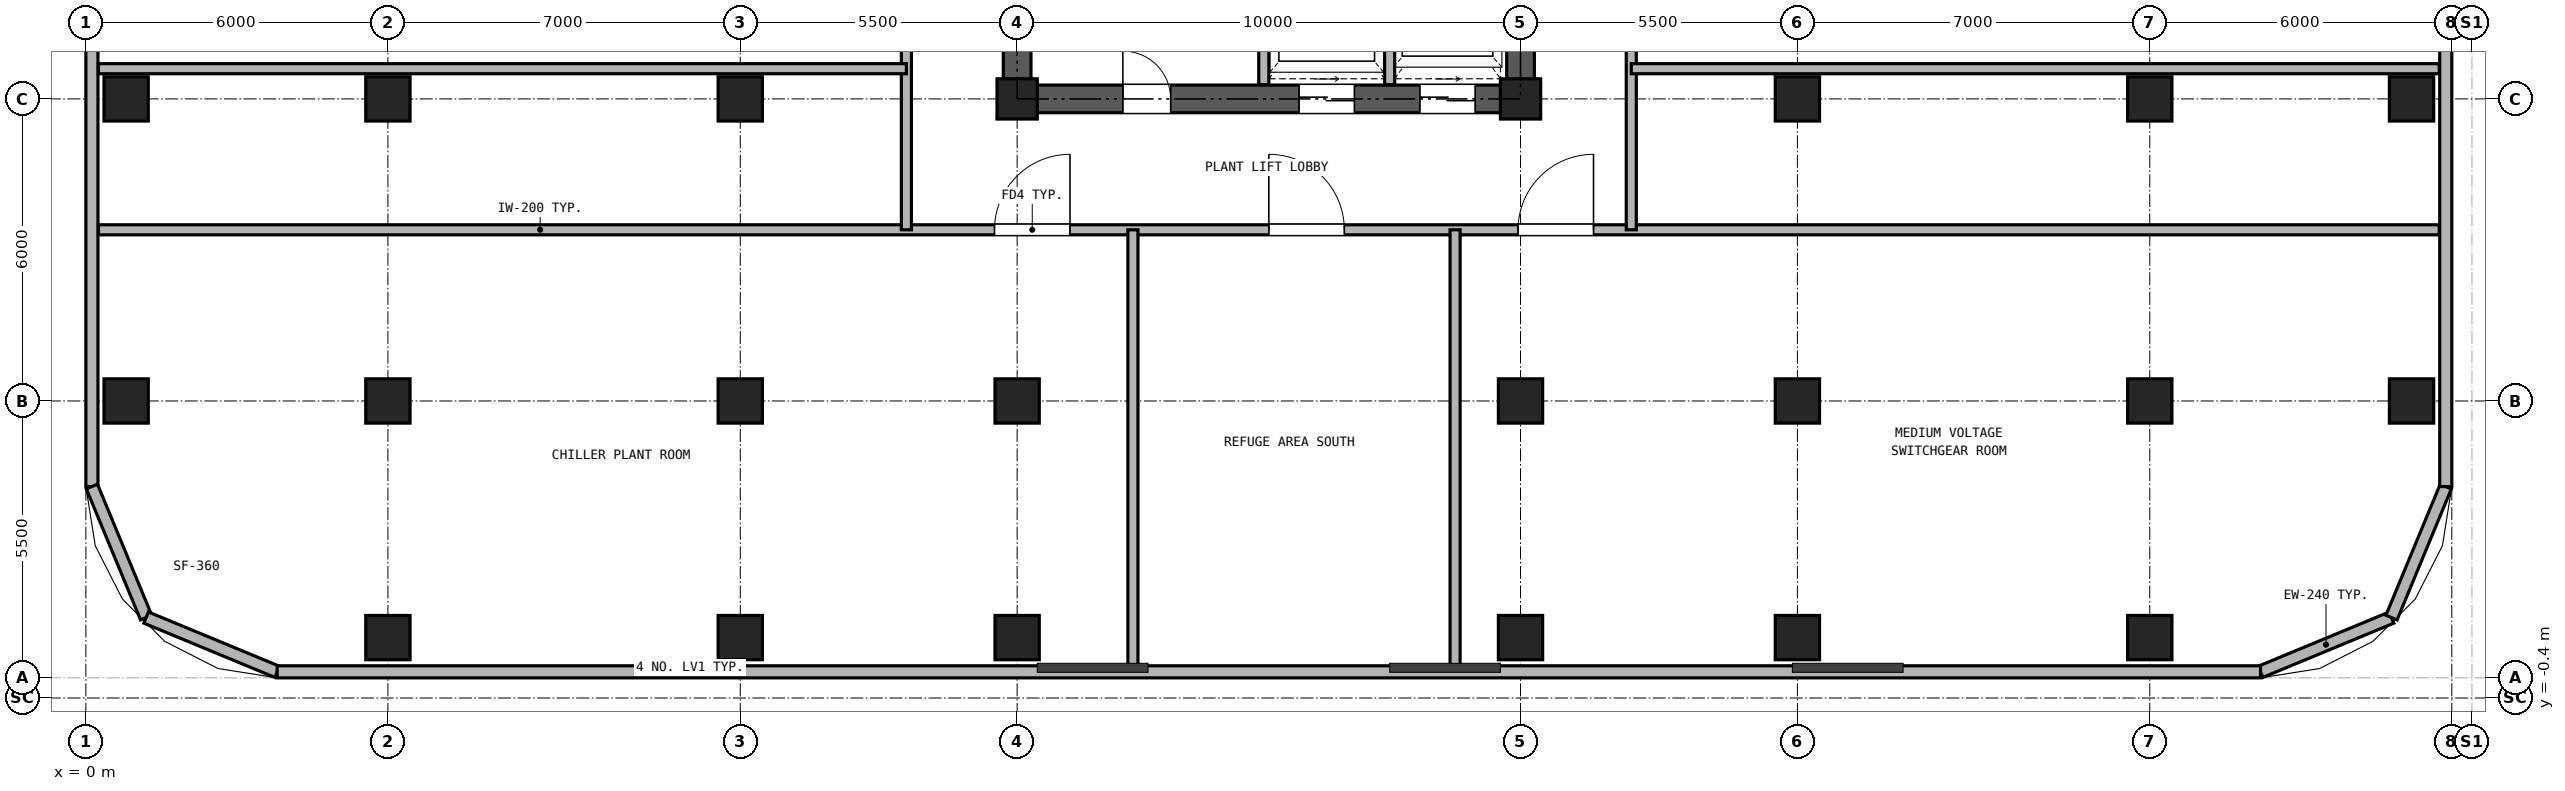
"""IFC4 building model, lengths in metres.
Left out: names, types, materials, properties, quantities, classifications, styles, units other than length and angle.
Written with IfcOpenShell. Run it as: python <this file> out.ifc"""

import sys

from ifc_helpers import new_model, si_unit, direction, frame, frame_2d, origin, origin_2d, place, context, subcontext, project, spatial, rectangle, hollow_rectangle, extrude, source, transform, mapped, element, fill, save


model = new_model("IFC4")
c1 = context("Model", 3, precision=1e-05, world=origin(), true_north=direction((0.0, 1.0)))
c2 = subcontext(c1, "Body", "Model", "MODEL_VIEW")
j1 = project(units=[si_unit("LENGTHUNIT", "METRE"), si_unit("PLANEANGLEUNIT", "RADIAN")], contexts=[c1])
p1 = place(None, origin())
s1 = spatial("IfcSite", under=j1, at=p1, CompositionType="ELEMENT")
p2 = place(p1, origin())
s2 = spatial("IfcBuilding", under=s1, at=p2, CompositionType="ELEMENT")
p3 = place(p2, frame((0.0, 0.0, 143.9)))
s3 = spatial("IfcBuildingStorey", under=s2, at=p3, CompositionType="ELEMENT", Elevation=143.9)
m1 = source(origin(), c2, "Body", "SweptSolid", [
    extrude(hollow_rectangle(XDim=0.88, YDim=0.88, WallThickness=0.05, at=origin_2d()), origin(), (0.0, 0.0, 1.0), 4.25),
])
for number, where, z_axis, x_axis in (
    (1, (6.0, 0.8, 0.0), (0.0, 0.0, 1.0), (1.0, 0.0, 0.0)),
    (2, (13.0, 0.8, 0.0), (0.0, 0.0, 1.0), (1.0, 0.0, 0.0)),
    (3, (18.5, 0.8, 0.0), (0.0, 0.0, 1.0), (1.0, 0.0, 0.0)),
    (4, (28.5, 0.8, 0.0), (0.0, 0.0, 1.0), (1.0, 0.0, 0.0)),
    (5, (34.0, 0.8, 0.0), (0.0, 0.0, 1.0), (1.0, 0.0, 0.0)),
    (6, (41.0, 0.8, 0.0), (0.0, 0.0, 1.0), (1.0, 0.0, 0.0)),
    (7, (0.8, 5.5, 0.0), (0.0, 0.0, 1.0), (1.0, 0.0, 0.0)),
    (8, (46.2, 5.5, 0.0), (0.0, 0.0, 1.0), (1.0, 0.0, 0.0)),
    (9, (0.8, 11.5, 0.0), (0.0, 0.0, 1.0), (1.0, 0.0, 0.0)),
    (10, (46.2, 11.5, 0.0), (0.0, 0.0, 1.0), (1.0, 0.0, 0.0)),
    (11, (6.0, 5.5, 0.0), (0.0, 0.0, 1.0), (1.0, 0.0, 0.0)),
    (12, (6.0, 11.5, 0.0), (0.0, 0.0, 1.0), (1.0, 0.0, 0.0)),
    (13, (13.0, 5.5, 0.0), (0.0, 0.0, 1.0), (1.0, 0.0, 0.0)),
    (14, (13.0, 11.5, 0.0), (0.0, 0.0, 1.0), (1.0, 0.0, 0.0)),
    (15, (18.5, 5.5, 0.0), (0.0, 0.0, 1.0), (1.0, 0.0, 0.0)),
):
    element("IfcColumn", number, at=place(p3, frame(where, z_axis=z_axis, x_axis=x_axis)), inside=s3, PredefinedType="COLUMN", context=c2, shape_type="MappedRepresentation", body=[
        mapped(m1, transform((0.0, 0.0, 0.0), x_axis=(1.0, 0.0, 0.0), y_axis=(0.0, 1.0, 0.0), z_axis=(0.0, 0.0, 1.0), scale=1.0)),
    ])
m2 = source(origin(), c2, "Body", "SweptSolid", [
    extrude(hollow_rectangle(XDim=0.8, YDim=0.8, WallThickness=0.045, at=origin_2d()), origin(), (0.0, 0.0, 1.0), 4.25),
])
p4 = place(p3, frame((18.5, 11.5, 0.0), z_axis=(0.0, 0.0, 1.0), x_axis=(1.0, 0.0, 0.0)))
e16 = element("IfcColumn", 16, at=p4, inside=s3, PredefinedType="COLUMN", context=c2, shape_type="MappedRepresentation", body=[
    mapped(m2, transform((0.0, 0.0, 0.0), x_axis=(1.0, 0.0, 0.0), y_axis=(0.0, 1.0, 0.0), z_axis=(0.0, 0.0, 1.0), scale=1.0)),
])
p5 = place(p3, frame((28.5, 5.5, 0.0), z_axis=(0.0, 0.0, 1.0), x_axis=(1.0, 0.0, 0.0)))
e17 = element("IfcColumn", 17, at=p5, inside=s3, PredefinedType="COLUMN", context=c2, shape_type="MappedRepresentation", body=[
    mapped(m1, transform((0.0, 0.0, 0.0), x_axis=(1.0, 0.0, 0.0), y_axis=(0.0, 1.0, 0.0), z_axis=(0.0, 0.0, 1.0), scale=1.0)),
])
p6 = place(p3, frame((28.5, 11.5, 0.0), z_axis=(0.0, 0.0, 1.0), x_axis=(1.0, 0.0, 0.0)))
e18 = element("IfcColumn", 18, at=p6, inside=s3, PredefinedType="COLUMN", context=c2, shape_type="MappedRepresentation", body=[
    mapped(m2, transform((0.0, 0.0, 0.0), x_axis=(1.0, 0.0, 0.0), y_axis=(0.0, 1.0, 0.0), z_axis=(0.0, 0.0, 1.0), scale=1.0)),
])
for number, where, z_axis, x_axis in (
    (19, (34.0, 5.5, 0.0), (0.0, 0.0, 1.0), (1.0, 0.0, 0.0)),
    (20, (34.0, 11.5, 0.0), (0.0, 0.0, 1.0), (1.0, 0.0, 0.0)),
    (21, (41.0, 5.5, 0.0), (0.0, 0.0, 1.0), (1.0, 0.0, 0.0)),
    (22, (41.0, 11.5, 0.0), (0.0, 0.0, 1.0), (1.0, 0.0, 0.0)),
):
    element("IfcColumn", number, at=place(p3, frame(where, z_axis=z_axis, x_axis=x_axis)), inside=s3, PredefinedType="COLUMN", context=c2, shape_type="MappedRepresentation", body=[
        mapped(m1, transform((0.0, 0.0, 0.0), x_axis=(1.0, 0.0, 0.0), y_axis=(0.0, 1.0, 0.0), z_axis=(0.0, 0.0, 1.0), scale=1.0)),
    ])
for number, where, z_axis, x_axis in (
    (23, (43.2, 0.12, 0.0), (0.0, 0.0, 1.0), (0.924, 0.383, 0.0)),
    (24, (45.802, 1.198, 0.0), (0.0, 0.0, 1.0), (0.383, 0.924, 0.0)),
):
    element("IfcWall", number, at=place(p3, frame(where, z_axis=z_axis, x_axis=x_axis)), inside=s3, PredefinedType="SOLIDWALL", context=c2, shape_type="SweptSolid", body=[
        extrude(rectangle(XDim=2.817, YDim=0.24, at=frame_2d((1.408, 0.0))), origin(), (0.0, 0.0, 1.0), 4.25),
    ])
for number, where, z_axis, x_axis in (
    (25, (46.88, 3.8, 0.0), (0.0, 0.0, 1.0), (0.0, 1.0, 0.0)),
    (26, (0.12, 31.5, 0.0), (0.0, 0.0, 1.0), (0.0, -1.0, 0.0)),
):
    element("IfcWall", number, at=place(p3, frame(where, z_axis=z_axis, x_axis=x_axis)), inside=s3, PredefinedType="SOLIDWALL", context=c2, shape_type="SweptSolid", body=[
        extrude(rectangle(XDim=27.7, YDim=0.24, at=frame_2d((13.85, 0.0))), origin(), (0.0, 0.0, 1.0), 4.25),
    ])
for number, where, z_axis, x_axis in (
    (27, (0.12, 3.8, 0.0), (0.0, 0.0, 1.0), (0.383, -0.924, 0.0)),
    (28, (1.198, 1.198, 0.0), (0.0, 0.0, 1.0), (0.924, -0.383, 0.0)),
):
    element("IfcWall", number, at=place(p3, frame(where, z_axis=z_axis, x_axis=x_axis)), inside=s3, PredefinedType="SOLIDWALL", context=c2, shape_type="SweptSolid", body=[
        extrude(rectangle(XDim=2.817, YDim=0.24, at=frame_2d((1.408, 0.0))), origin(), (0.0, 0.0, 1.0), 4.25),
    ])
p7 = place(p3, frame((3.8, 0.12, 0.0), z_axis=(0.0, 0.0, 1.0), x_axis=(1.0, 0.0, 0.0)))
e29 = element("IfcWall", 29, at=p7, inside=s3, PredefinedType="SOLIDWALL", context=c2, shape_type="SweptSolid", body=[
    extrude(rectangle(XDim=39.4, YDim=0.24, at=frame_2d((19.7, 0.0))), origin(), (0.0, 0.0, 1.0), 4.25),
])
p8 = place(p3, frame((18.225, 11.5, 0.0), z_axis=(0.0, 0.0, 1.0), x_axis=(1.0, 0.0, 0.0)))
e30 = element("IfcWall", 30, at=p8, inside=s3, PredefinedType="SHEAR", context=c2, shape_type="SweptSolid", body=[
    extrude(rectangle(XDim=10.55, YDim=0.55, at=frame_2d((5.275, 0.0))), origin(), (0.0, 0.0, 1.0), 4.25),
])
p9 = place(p8, frame((2.375, 0.0, 0.0)))
e31 = element("IfcOpeningElement", 31, at=p9, cuts=e30, PredefinedType="OPENING", context=c2, shape_type="SweptSolid", body=[
    extrude(rectangle(XDim=0.95, YDim=2.15, at=frame_2d((0.475, 1.075))), frame((0.0, 0.285, 0.0), z_axis=(0.0, -1.0, 0.0), x_axis=(1.0, 0.0, 0.0)), (0.0, 0.0, 1.0), 0.57),
])
p10 = place(p8, frame((5.875, 0.0, 0.0)))
e32 = element("IfcOpeningElement", 32, at=p10, cuts=e30, PredefinedType="OPENING", context=c2, shape_type="SweptSolid", body=[
    extrude(rectangle(XDim=1.1, YDim=2.25, at=frame_2d((0.55, 1.125))), frame((0.0, 0.285, 0.0), z_axis=(0.0, -1.0, 0.0), x_axis=(1.0, 0.0, 0.0)), (0.0, 0.0, 1.0), 0.57),
])
p11 = place(p8, frame((8.275, 0.0, 0.0)))
e33 = element("IfcOpeningElement", 33, at=p11, cuts=e30, PredefinedType="OPENING", context=c2, shape_type="SweptSolid", body=[
    extrude(rectangle(XDim=1.1, YDim=2.25, at=frame_2d((0.55, 1.125))), frame((0.0, 0.285, 0.0), z_axis=(0.0, -1.0, 0.0), x_axis=(1.0, 0.0, 0.0)), (0.0, 0.0, 1.0), 0.57),
])
p12 = place(p3, frame((18.5, 11.775, 0.0), z_axis=(0.0, 0.0, 1.0), x_axis=(0.0, 1.0, 0.0)))
e34 = element("IfcWall", 34, at=p12, inside=s3, PredefinedType="SHEAR", context=c2, shape_type="SweptSolid", body=[
    extrude(rectangle(XDim=16.7, YDim=0.55, at=frame_2d((8.35, 0.0))), origin(), (0.0, 0.0, 1.0), 4.25),
])
p13 = place(p12, frame((7.375, 0.0, 0.0)))
e35 = element("IfcOpeningElement", 35, at=p13, cuts=e34, PredefinedType="OPENING", context=c2, shape_type="SweptSolid", body=[
    extrude(rectangle(XDim=1.15, YDim=2.2, at=frame_2d((0.575, 1.1))), frame((0.0, 0.285, 0.0), z_axis=(0.0, -1.0, 0.0), x_axis=(1.0, 0.0, 0.0)), (0.0, 0.0, 1.0), 0.57),
])
p14 = place(p3, frame((28.5, 11.775, 0.0), z_axis=(0.0, 0.0, 1.0), x_axis=(0.0, 1.0, 0.0)))
e36 = element("IfcWall", 36, at=p14, inside=s3, PredefinedType="SHEAR", context=c2, shape_type="SweptSolid", body=[
    extrude(rectangle(XDim=16.7, YDim=0.55, at=frame_2d((8.35, 0.0))), origin(), (0.0, 0.0, 1.0), 4.25),
])
p15 = place(p14, frame((7.375, 0.0, 0.0)))
e37 = element("IfcOpeningElement", 37, at=p15, cuts=e36, PredefinedType="OPENING", context=c2, shape_type="SweptSolid", body=[
    extrude(rectangle(XDim=1.15, YDim=2.2, at=frame_2d((0.575, 1.1))), frame((0.0, 0.285, 0.0), z_axis=(0.0, -1.0, 0.0), x_axis=(1.0, 0.0, 0.0)), (0.0, 0.0, 1.0), 0.57),
])
for number, where, z_axis, x_axis in (
    (38, (23.4, 11.785, 0.0), (0.0, 0.0, 1.0), (0.0, 1.0, 0.0)),
    (39, (25.9, 11.785, 0.0), (0.0, 0.0, 1.0), (0.0, 1.0, 0.0)),
):
    element("IfcWall", number, at=place(p3, frame(where, z_axis=z_axis, x_axis=x_axis)), inside=s3, PredefinedType="PARTITIONING", context=c2, shape_type="SweptSolid", body=[
        extrude(rectangle(XDim=3.215, YDim=0.2, at=frame_2d((1.607, 0.0))), origin(), (0.0, 0.0, 1.0), 4.25),
    ])
p16 = place(p3, frame((0.25, 8.9, 0.0), z_axis=(0.0, 0.0, 1.0), x_axis=(1.0, 0.0, 0.0)))
e40 = element("IfcWall", 40, at=p16, inside=s3, PredefinedType="PARTITIONING", context=c2, shape_type="SweptSolid", body=[
    extrude(rectangle(XDim=46.5, YDim=0.2, at=frame_2d((23.25, 0.0))), origin(), (0.0, 0.0, 1.0), 4.25),
])
p17 = place(p16, frame((17.8, 0.0, 0.0)))
e41 = element("IfcOpeningElement", 41, at=p17, cuts=e40, PredefinedType="OPENING", context=c2, shape_type="SweptSolid", body=[
    extrude(rectangle(XDim=1.5, YDim=2.25, at=frame_2d((0.75, 1.125))), frame((0.0, 0.11, 0.0), z_axis=(0.0, -1.0, 0.0), x_axis=(1.0, 0.0, 0.0)), (0.0, 0.0, 1.0), 0.22),
])
p18 = place(p16, frame((23.25, 0.0, 0.0)))
e42 = element("IfcOpeningElement", 42, at=p18, cuts=e40, PredefinedType="OPENING", context=c2, shape_type="SweptSolid", body=[
    extrude(rectangle(XDim=1.5, YDim=2.25, at=frame_2d((0.75, 1.125))), frame((0.0, 0.11, 0.0), z_axis=(0.0, -1.0, 0.0), x_axis=(1.0, 0.0, 0.0)), (0.0, 0.0, 1.0), 0.22),
])
p19 = place(p16, frame((28.2, 0.0, 0.0)))
e43 = element("IfcOpeningElement", 43, at=p19, cuts=e40, PredefinedType="OPENING", context=c2, shape_type="SweptSolid", body=[
    extrude(rectangle(XDim=1.5, YDim=2.25, at=frame_2d((0.75, 1.125))), frame((0.0, 0.11, 0.0), z_axis=(0.0, -1.0, 0.0), x_axis=(1.0, 0.0, 0.0)), (0.0, 0.0, 1.0), 0.22),
])
p20 = place(p3, frame((16.3, 8.9, 0.0), z_axis=(0.0, 0.0, 1.0), x_axis=(0.0, 1.0, 0.0)))
e44 = element("IfcWall", 44, at=p20, inside=s3, PredefinedType="PARTITIONING", context=c2, shape_type="SweptSolid", body=[
    extrude(rectangle(XDim=19.85, YDim=0.2, at=frame_2d((9.925, 0.0))), origin(), (0.0, 0.0, 1.0), 4.25),
])
p21 = place(p20, frame((10.6, 0.0, 0.0)))
e45 = element("IfcOpeningElement", 45, at=p21, cuts=e44, PredefinedType="OPENING", context=c2, shape_type="SweptSolid", body=[
    extrude(rectangle(XDim=1.05, YDim=2.15, at=frame_2d((0.525, 1.075))), frame((0.0, 0.11, 0.0), z_axis=(0.0, -1.0, 0.0), x_axis=(1.0, 0.0, 0.0)), (0.0, 0.0, 1.0), 0.22),
])
p22 = place(p3, frame((30.7, 8.9, 0.0), z_axis=(0.0, 0.0, 1.0), x_axis=(0.0, 1.0, 0.0)))
e46 = element("IfcWall", 46, at=p22, inside=s3, PredefinedType="PARTITIONING", context=c2, shape_type="SweptSolid", body=[
    extrude(rectangle(XDim=19.85, YDim=0.2, at=frame_2d((9.925, 0.0))), origin(), (0.0, 0.0, 1.0), 4.25),
])
p23 = place(p22, frame((10.6, 0.0, 0.0)))
e47 = element("IfcOpeningElement", 47, at=p23, cuts=e46, PredefinedType="OPENING", context=c2, shape_type="SweptSolid", body=[
    extrude(rectangle(XDim=1.5, YDim=2.25, at=frame_2d((0.75, 1.125))), frame((0.0, 0.11, 0.0), z_axis=(0.0, -1.0, 0.0), x_axis=(1.0, 0.0, 0.0)), (0.0, 0.0, 1.0), 0.22),
])
for number, where, z_axis, x_axis in (
    (48, (20.8, 0.25, 0.0), (0.0, 0.0, 1.0), (0.0, 1.0, 0.0)),
    (49, (27.2, 0.25, 0.0), (0.0, 0.0, 1.0), (0.0, 1.0, 0.0)),
):
    element("IfcWall", number, at=place(p3, frame(where, z_axis=z_axis, x_axis=x_axis)), inside=s3, PredefinedType="PARTITIONING", context=c2, shape_type="SweptSolid", body=[
        extrude(rectangle(XDim=8.65, YDim=0.2, at=frame_2d((4.325, 0.0))), origin(), (0.0, 0.0, 1.0), 4.25),
    ])
for number, where, z_axis, x_axis in (
    (50, (0.25, 12.1, 0.0), (0.0, 0.0, 1.0), (1.0, 0.0, 0.0)),
    (51, (30.7, 12.1, 0.0), (0.0, 0.0, 1.0), (1.0, 0.0, 0.0)),
):
    element("IfcWall", number, at=place(p3, frame(where, z_axis=z_axis, x_axis=x_axis)), inside=s3, PredefinedType="PARTITIONING", context=c2, shape_type="SweptSolid", body=[
        extrude(rectangle(XDim=16.05, YDim=0.2, at=frame_2d((8.025, 0.0))), origin(), (0.0, 0.0, 1.0), 4.25),
    ])
p24 = place(p9, frame((0.95, 0.0, 0.0), z_axis=(0.0, 0.0, 1.0), x_axis=(-1.0, 0.0, 0.0)))
e52 = element("IfcDoor", 52, at=p24, inside=s3, OperationType="SINGLE_SWING_LEFT", PredefinedType="DOOR", context=c2, shape_type="SweptSolid", body=[
    extrude(rectangle(XDim=0.95, YDim=2.15, at=frame_2d((0.475, 1.075))), frame((0.0, 0.025, 0.0), z_axis=(0.0, -1.0, 0.0), x_axis=(1.0, 0.0, 0.0)), (0.0, 0.0, 1.0), 0.05),
])
fill(e31, e52)
p25 = place(p10, frame((1.1, 0.0, 0.0), z_axis=(0.0, 0.0, 1.0), x_axis=(-1.0, 0.0, 0.0)))
e53 = element("IfcDoor", 53, at=p25, inside=s3, OperationType="DOUBLE_DOOR_SLIDING", PredefinedType="DOOR", context=c2, shape_type="SweptSolid", body=[
    extrude(rectangle(XDim=1.1, YDim=2.25, at=frame_2d((0.55, 1.125))), frame((0.0, 0.025, 0.0), z_axis=(0.0, -1.0, 0.0), x_axis=(1.0, 0.0, 0.0)), (0.0, 0.0, 1.0), 0.05),
])
fill(e32, e53)
p26 = place(p11, frame((1.1, 0.0, 0.0), z_axis=(0.0, 0.0, 1.0), x_axis=(-1.0, 0.0, 0.0)))
e54 = element("IfcDoor", 54, at=p26, inside=s3, OperationType="DOUBLE_DOOR_SLIDING", PredefinedType="DOOR", context=c2, shape_type="SweptSolid", body=[
    extrude(rectangle(XDim=1.1, YDim=2.25, at=frame_2d((0.55, 1.125))), frame((0.0, 0.025, 0.0), z_axis=(0.0, -1.0, 0.0), x_axis=(1.0, 0.0, 0.0)), (0.0, 0.0, 1.0), 0.05),
])
fill(e33, e54)
p27 = place(p17, frame((1.5, 0.0, 0.0), z_axis=(0.0, 0.0, 1.0), x_axis=(-1.0, 0.0, 0.0)))
e55 = element("IfcDoor", 55, at=p27, inside=s3, OperationType="SINGLE_SWING_RIGHT", PredefinedType="DOOR", context=c2, shape_type="SweptSolid", body=[
    extrude(rectangle(XDim=1.5, YDim=2.25, at=frame_2d((0.75, 1.125))), frame((0.0, 0.025, 0.0), z_axis=(0.0, -1.0, 0.0), x_axis=(1.0, 0.0, 0.0)), (0.0, 0.0, 1.0), 0.05),
])
fill(e41, e55)
p28 = place(p18, frame((1.5, 0.0, 0.0), z_axis=(0.0, 0.0, 1.0), x_axis=(-1.0, 0.0, 0.0)))
e56 = element("IfcDoor", 56, at=p28, inside=s3, OperationType="SINGLE_SWING_LEFT", PredefinedType="DOOR", context=c2, shape_type="SweptSolid", body=[
    extrude(rectangle(XDim=1.5, YDim=2.25, at=frame_2d((0.75, 1.125))), frame((0.0, 0.025, 0.0), z_axis=(0.0, -1.0, 0.0), x_axis=(1.0, 0.0, 0.0)), (0.0, 0.0, 1.0), 0.05),
])
fill(e42, e56)
p29 = place(p19, frame((1.5, 0.0, 0.0), z_axis=(0.0, 0.0, 1.0), x_axis=(-1.0, 0.0, 0.0)))
e57 = element("IfcDoor", 57, at=p29, inside=s3, OperationType="SINGLE_SWING_RIGHT", PredefinedType="DOOR", context=c2, shape_type="SweptSolid", body=[
    extrude(rectangle(XDim=1.5, YDim=2.25, at=frame_2d((0.75, 1.125))), frame((0.0, 0.025, 0.0), z_axis=(0.0, -1.0, 0.0), x_axis=(1.0, 0.0, 0.0)), (0.0, 0.0, 1.0), 0.05),
])
fill(e43, e57)
save(model, sys.argv[1])
